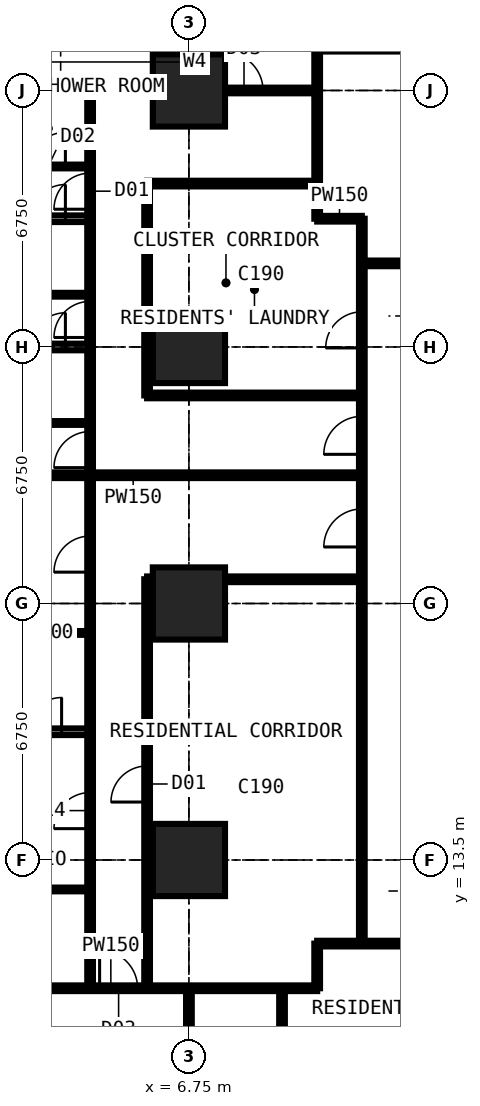
"""IFC4 building model, lengths in metres.
Left out: names, types, materials, properties, quantities, classifications, styles, units other than length and angle.
Written with IfcOpenShell. Run it as: python <this file> out.ifc"""

import sys

from ifc_helpers import new_model, si_unit, direction, frame, frame_2d, origin, origin_2d, place, context, subcontext, project, spatial, rectangle, extrude, element, fill, save


model = new_model("IFC4")
c1 = context("Model", 3, precision=1e-05, world=origin(), true_north=direction((0.0, 1.0)))
c2 = subcontext(c1, "Body", "Model", "MODEL_VIEW")
j1 = project(units=[si_unit("LENGTHUNIT", "METRE"), si_unit("PLANEANGLEUNIT", "RADIAN")], contexts=[c1])
p1 = place(None, origin())
s1 = spatial("IfcSite", under=j1, at=p1, CompositionType="ELEMENT")
p2 = place(p1, origin())
s2 = spatial("IfcBuilding", under=s1, at=p2, CompositionType="ELEMENT")
p3 = place(p2, frame((0.0, 0.0, 21.6)))
s3 = spatial("IfcBuildingStorey", under=s2, at=p3, CompositionType="ELEMENT", Elevation=21.6)
for number, where, z_axis, x_axis in (
    (1, (6.75, 13.5, 0.0), (0.0, 0.0, 1.0), (1.0, 0.0, 0.0)),
    (2, (6.75, 20.25, 0.0), (0.0, 0.0, 1.0), (1.0, 0.0, 0.0)),
    (3, (6.75, 27.0, 0.0), (0.0, 0.0, 1.0), (1.0, 0.0, 0.0)),
    (4, (6.75, 33.75, 0.0), (0.0, 0.0, 1.0), (1.0, 0.0, 0.0)),
):
    element("IfcColumn", number, at=place(p3, frame(where, z_axis=z_axis, x_axis=x_axis)), inside=s3, PredefinedType="COLUMN", context=c2, shape_type="SweptSolid", body=[
        extrude(rectangle(XDim=1.9, YDim=1.9, at=origin_2d()), origin(), (0.0, 0.0, 1.0), 3.6),
    ])
p4 = place(p3, frame((-0.734, 10.125, 0.0), z_axis=(0.0, 0.0, 1.0), x_axis=(1.0, 0.0, 0.0)))
e5 = element("IfcWall", 5, at=p4, inside=s3, PredefinedType="PARTITIONING", context=c2, shape_type="SweptSolid", body=[
    extrude(rectangle(XDim=10.859, YDim=0.15, at=frame_2d((5.429, 0.0))), origin(), (0.0, 0.0, 1.0), 3.375),
])
p5 = place(p4, frame((5.134, 0.0, 0.0)))
e6 = element("IfcOpeningElement", 6, at=p5, cuts=e5, PredefinedType="OPENING", context=c2, shape_type="SweptSolid", body=[
    extrude(rectangle(XDim=1.0, YDim=2.2, at=frame_2d((0.5, 1.1))), frame((0.0, 0.085, 0.0), z_axis=(0.0, -1.0, 0.0), x_axis=(1.0, 0.0, 0.0)), (0.0, 0.0, 1.0), 0.17),
])
p6 = place(p3, frame((-0.734, 16.875, 0.0), z_axis=(0.0, 0.0, 1.0), x_axis=(1.0, 0.0, 0.0)))
e7 = element("IfcWall", 7, at=p6, inside=s3, PredefinedType="PARTITIONING", context=c2, shape_type="SweptSolid", body=[
    extrude(rectangle(XDim=4.884, YDim=0.175, at=frame_2d((2.442, 0.0))), origin(), (0.0, 0.0, 1.0), 3.375),
])
p7 = place(p6, frame((3.234, 0.0, 0.0)))
e8 = element("IfcOpeningElement", 8, at=p7, cuts=e7, PredefinedType="OPENING", context=c2, shape_type="SweptSolid", body=[
    extrude(rectangle(XDim=0.9, YDim=2.2, at=frame_2d((0.45, 1.1))), frame((0.0, 0.097, 0.0), z_axis=(0.0, -1.0, 0.0), x_axis=(1.0, 0.0, 0.0)), (0.0, 0.0, 1.0), 0.195),
])
p8 = place(p3, frame((-0.734, 23.625, 0.0), z_axis=(0.0, 0.0, 1.0), x_axis=(1.0, 0.0, 0.0)))
e9 = element("IfcWall", 9, at=p8, inside=s3, PredefinedType="PARTITIONING", context=c2, shape_type="SweptSolid", body=[
    extrude(rectangle(XDim=12.034, YDim=0.15, at=frame_2d((6.017, 0.0))), origin(), (0.0, 0.0, 1.0), 3.375),
])
p9 = place(p3, frame((-0.734, 27.0, 0.0), z_axis=(0.0, 0.0, 1.0), x_axis=(1.0, 0.0, 0.0)))
e10 = element("IfcWall", 10, at=p9, inside=s3, PredefinedType="PARTITIONING", context=c2, shape_type="SweptSolid", body=[
    extrude(rectangle(XDim=4.884, YDim=0.175, at=frame_2d((2.442, 0.0))), origin(), (0.0, 0.0, 1.0), 2.877),
])
p10 = place(p9, frame((3.334, 0.0, 0.0)))
e11 = element("IfcOpeningElement", 11, at=p10, cuts=e10, PredefinedType="OPENING", context=c2, shape_type="SweptSolid", body=[
    extrude(rectangle(XDim=0.9, YDim=2.2, at=frame_2d((0.45, 1.1))), frame((0.0, 0.097, 0.0), z_axis=(0.0, -1.0, 0.0), x_axis=(1.0, 0.0, 0.0)), (0.0, 0.0, 1.0), 0.195),
])
p11 = place(p3, frame((-0.734, 30.375, 0.0), z_axis=(0.0, 0.0, 1.0), x_axis=(1.0, 0.0, 0.0)))
e12 = element("IfcWall", 12, at=p11, inside=s3, PredefinedType="PARTITIONING", context=c2, shape_type="SweptSolid", body=[
    extrude(rectangle(XDim=4.884, YDim=0.175, at=frame_2d((2.442, 0.0))), origin(), (0.0, 0.0, 1.0), 3.375),
])
p12 = place(p11, frame((3.334, 0.0, 0.0)))
e13 = element("IfcOpeningElement", 13, at=p12, cuts=e12, PredefinedType="OPENING", context=c2, shape_type="SweptSolid", body=[
    extrude(rectangle(XDim=0.9, YDim=2.2, at=frame_2d((0.45, 1.1))), frame((0.0, 0.097, 0.0), z_axis=(0.0, -1.0, 0.0), x_axis=(1.0, 0.0, 0.0)), (0.0, 0.0, 1.0), 0.195),
])
p13 = place(p3, frame((-0.734, 33.75, 0.0), z_axis=(0.0, 0.0, 1.0), x_axis=(1.0, 0.0, 0.0)))
e14 = element("IfcWall", 14, at=p13, inside=s3, PredefinedType="PARTITIONING", context=c2, shape_type="SweptSolid", body=[
    extrude(rectangle(XDim=10.859, YDim=0.15, at=frame_2d((5.429, 0.0))), origin(), (0.0, 0.0, 1.0), 2.877),
])
p14 = place(p13, frame((8.434, 0.0, 0.0)))
e15 = element("IfcOpeningElement", 15, at=p14, cuts=e14, PredefinedType="OPENING", context=c2, shape_type="SweptSolid", body=[
    extrude(rectangle(XDim=1.0, YDim=2.2, at=frame_2d((0.5, 1.1))), frame((0.0, 0.085, 0.0), z_axis=(0.0, -1.0, 0.0), x_axis=(1.0, 0.0, 0.0)), (0.0, 0.0, 1.0), 0.17),
])
for number, where, z_axis, x_axis in (
    (16, (1.75, 12.725, 0.0), (0.0, 0.0, 1.0), (1.0, 0.0, 0.0)),
    (17, (1.75, 19.475, 0.0), (0.0, 0.0, 1.0), (1.0, 0.0, 0.0)),
):
    element("IfcWall", number, at=place(p3, frame(where, z_axis=z_axis, x_axis=x_axis)), inside=s3, PredefinedType="PARTITIONING", context=c2, shape_type="SweptSolid", body=[
        extrude(rectangle(XDim=2.4, YDim=0.1, at=frame_2d((1.2, 0.0))), origin(), (0.0, 0.0, 1.0), 3.375),
    ])
for number, where, z_axis, x_axis in (
    (18, (1.95, 25.0, 0.0), (0.0, 0.0, 1.0), (1.0, 0.0, 0.0)),
    (19, (1.95, 28.375, 0.0), (0.0, 0.0, 1.0), (1.0, 0.0, 0.0)),
):
    element("IfcWall", number, at=place(p3, frame(where, z_axis=z_axis, x_axis=x_axis)), inside=s3, PredefinedType="PARTITIONING", context=c2, shape_type="SweptSolid", body=[
        extrude(rectangle(XDim=2.2, YDim=0.1, at=frame_2d((1.1, 0.0))), origin(), (0.0, 0.0, 1.0), 3.375),
    ])
p15 = place(p3, frame((1.95, 31.75, 0.0), z_axis=(0.0, 0.0, 1.0), x_axis=(1.0, 0.0, 0.0)))
e20 = element("IfcWall", 20, at=p15, inside=s3, PredefinedType="PARTITIONING", context=c2, shape_type="SweptSolid", body=[
    extrude(rectangle(XDim=2.2, YDim=0.1, at=frame_2d((1.1, 0.0))), origin(), (0.0, 0.0, 1.0), 3.375),
])
p16 = place(p15, frame((0.65, 0.0, 0.0)))
e21 = element("IfcOpeningElement", 21, at=p16, cuts=e20, PredefinedType="OPENING", context=c2, shape_type="SweptSolid", body=[
    extrude(rectangle(XDim=0.9, YDim=2.2, at=frame_2d((0.45, 1.1))), frame((0.0, 0.06, 0.0), z_axis=(0.0, -1.0, 0.0), x_axis=(1.0, 0.0, 0.0)), (0.0, 0.0, 1.0), 0.12),
])
p17 = place(p3, frame((4.15, 10.125, 0.0), z_axis=(0.0, 0.0, 1.0), x_axis=(0.0, 1.0, 0.0)))
e22 = element("IfcWall", 22, at=p17, inside=s3, PredefinedType="PARTITIONING", context=c2, shape_type="SweptSolid", body=[
    extrude(rectangle(XDim=23.625, YDim=0.15, at=frame_2d((11.812, 0.0))), origin(), (0.0, 0.0, 1.0), 3.375),
])
p18 = place(p17, frame((20.5, 0.0, 0.0)))
e23 = element("IfcOpeningElement", 23, at=p18, cuts=e22, PredefinedType="OPENING", context=c2, shape_type="SweptSolid", body=[
    extrude(rectangle(XDim=0.95, YDim=2.2, at=frame_2d((0.475, 1.1))), frame((0.0, 0.085, 0.0), z_axis=(0.0, -1.0, 0.0), x_axis=(1.0, 0.0, 0.0)), (0.0, 0.0, 1.0), 0.17),
])
p19 = place(p17, frame((17.125, 0.0, 0.0)))
e24 = element("IfcOpeningElement", 24, at=p19, cuts=e22, PredefinedType="OPENING", context=c2, shape_type="SweptSolid", body=[
    extrude(rectangle(XDim=0.95, YDim=2.2, at=frame_2d((0.475, 1.1))), frame((0.0, 0.085, 0.0), z_axis=(0.0, -1.0, 0.0), x_axis=(1.0, 0.0, 0.0)), (0.0, 0.0, 1.0), 0.17),
])
p20 = place(p17, frame((13.7, 0.0, 0.0)))
e25 = element("IfcOpeningElement", 25, at=p20, cuts=e22, PredefinedType="OPENING", context=c2, shape_type="SweptSolid", body=[
    extrude(rectangle(XDim=0.95, YDim=2.2, at=frame_2d((0.475, 1.1))), frame((0.0, 0.085, 0.0), z_axis=(0.0, -1.0, 0.0), x_axis=(1.0, 0.0, 0.0)), (0.0, 0.0, 1.0), 0.17),
])
p21 = place(p17, frame((4.2, 0.0, 0.0)))
e26 = element("IfcOpeningElement", 26, at=p21, cuts=e22, PredefinedType="OPENING", context=c2, shape_type="SweptSolid", body=[
    extrude(rectangle(XDim=0.95, YDim=2.2, at=frame_2d((0.475, 1.1))), frame((0.0, 0.085, 0.0), z_axis=(0.0, -1.0, 0.0), x_axis=(1.0, 0.0, 0.0)), (0.0, 0.0, 1.0), 0.17),
])
p22 = place(p17, frame((10.95, 0.0, 0.0)))
e27 = element("IfcOpeningElement", 27, at=p22, cuts=e22, PredefinedType="OPENING", context=c2, shape_type="SweptSolid", body=[
    extrude(rectangle(XDim=0.95, YDim=2.2, at=frame_2d((0.475, 1.1))), frame((0.0, 0.085, 0.0), z_axis=(0.0, -1.0, 0.0), x_axis=(1.0, 0.0, 0.0)), (0.0, 0.0, 1.0), 0.17),
])
p23 = place(p3, frame((5.65, 10.125, 0.0), z_axis=(0.0, 0.0, 1.0), x_axis=(0.0, 1.0, 0.0)))
e28 = element("IfcWall", 28, at=p23, inside=s3, PredefinedType="PARTITIONING", context=c2, shape_type="SweptSolid", body=[
    extrude(rectangle(XDim=10.762, YDim=0.15, at=frame_2d((5.381, 0.0))), origin(), (0.0, 0.0, 1.0), 3.375),
])
p24 = place(p23, frame((4.9, 0.0, 0.0)))
e29 = element("IfcOpeningElement", 29, at=p24, cuts=e28, PredefinedType="OPENING", context=c2, shape_type="SweptSolid", body=[
    extrude(rectangle(XDim=0.95, YDim=2.2, at=frame_2d((0.475, 1.1))), frame((0.0, 0.085, 0.0), z_axis=(0.0, -1.0, 0.0), x_axis=(1.0, 0.0, 0.0)), (0.0, 0.0, 1.0), 0.17),
])
p25 = place(p3, frame((5.65, 20.887, 0.0), z_axis=(0.0, 0.0, 1.0), x_axis=(1.0, 0.0, 0.0)))
e30 = element("IfcWall", 30, at=p25, inside=s3, PredefinedType="PARTITIONING", context=c2, shape_type="SweptSolid", body=[
    extrude(rectangle(XDim=5.65, YDim=0.15, at=frame_2d((2.825, 0.0))), origin(), (0.0, 0.0, 1.0), 3.375),
])
p26 = place(p3, frame((5.65, 25.725, 0.0), z_axis=(0.0, 0.0, 1.0), x_axis=(0.0, 1.0, 0.0)))
e31 = element("IfcWall", 31, at=p26, inside=s3, PredefinedType="PARTITIONING", context=c2, shape_type="SweptSolid", body=[
    extrude(rectangle(XDim=5.575, YDim=0.15, at=frame_2d((2.788, 0.0))), origin(), (0.0, 0.0, 1.0), 3.375),
])
p27 = place(p3, frame((5.65, 25.725, 0.0), z_axis=(0.0, 0.0, 1.0), x_axis=(1.0, 0.0, 0.0)))
e32 = element("IfcWall", 32, at=p27, inside=s3, PredefinedType="PARTITIONING", context=c2, shape_type="SweptSolid", body=[
    extrude(rectangle(XDim=5.65, YDim=0.15, at=frame_2d((2.825, 0.0))), origin(), (0.0, 0.0, 1.0), 3.375),
])
p28 = place(p3, frame((5.65, 31.3, 0.0), z_axis=(0.0, 0.0, 1.0), x_axis=(1.0, 0.0, 0.0)))
e33 = element("IfcWall", 33, at=p28, inside=s3, PredefinedType="PARTITIONING", context=c2, shape_type="SweptSolid", body=[
    extrude(rectangle(XDim=4.475, YDim=0.15, at=frame_2d((2.238, 0.0))), origin(), (0.0, 0.0, 1.0), 3.375),
])
p29 = place(p3, frame((6.75, -0.734, 0.0), z_axis=(0.0, 0.0, 1.0), x_axis=(0.0, 1.0, 0.0)))
e34 = element("IfcWall", 34, at=p29, inside=s3, PredefinedType="PARTITIONING", context=c2, shape_type="SweptSolid", body=[
    extrude(rectangle(XDim=10.859, YDim=0.15, at=frame_2d((5.429, 0.0))), origin(), (0.0, 0.0, 1.0), 2.877),
])
p30 = place(p3, frame((9.2, 5.65, 0.0), z_axis=(0.0, 0.0, 1.0), x_axis=(0.0, 1.0, 0.0)))
e35 = element("IfcWall", 35, at=p30, inside=s3, PredefinedType="PARTITIONING", context=c2, shape_type="SweptSolid", body=[
    extrude(rectangle(XDim=4.475, YDim=0.15, at=frame_2d((2.238, 0.0))), origin(), (0.0, 0.0, 1.0), 3.375),
])
p31 = place(p3, frame((10.125, 10.125, 0.0), z_axis=(0.0, 0.0, 1.0), x_axis=(0.0, 1.0, 0.0)))
e36 = element("IfcWall", 36, at=p31, inside=s3, PredefinedType="PARTITIONING", context=c2, shape_type="SweptSolid", body=[
    extrude(rectangle(XDim=1.175, YDim=0.15, at=frame_2d((0.587, 0.0))), origin(), (0.0, 0.0, 1.0), 3.375),
])
p32 = place(p3, frame((10.125, 11.3, 0.0), z_axis=(0.0, 0.0, 1.0), x_axis=(1.0, 0.0, 0.0)))
e37 = element("IfcWall", 37, at=p32, inside=s3, PredefinedType="PARTITIONING", context=c2, shape_type="SweptSolid", body=[
    extrude(rectangle(XDim=20.675, YDim=0.15, at=frame_2d((10.337, 0.0))), origin(), (0.0, 0.0, 1.0), 3.375),
])
p33 = place(p32, frame((8.375, 0.0, 0.0)))
e38 = element("IfcOpeningElement", 38, at=p33, cuts=e37, PredefinedType="OPENING", context=c2, shape_type="SweptSolid", body=[
    extrude(rectangle(XDim=1.0, YDim=2.2, at=frame_2d((0.5, 1.1))), frame((0.0, 0.085, 0.0), z_axis=(0.0, -1.0, 0.0), x_axis=(1.0, 0.0, 0.0)), (0.0, 0.0, 1.0), 0.17),
])
p34 = place(p32, frame((10.975, 0.0, 0.0)))
e39 = element("IfcOpeningElement", 39, at=p34, cuts=e37, PredefinedType="OPENING", context=c2, shape_type="SweptSolid", body=[
    extrude(rectangle(XDim=1.0, YDim=2.2, at=frame_2d((0.5, 1.1))), frame((0.0, 0.085, 0.0), z_axis=(0.0, -1.0, 0.0), x_axis=(1.0, 0.0, 0.0)), (0.0, 0.0, 1.0), 0.17),
])
p35 = place(p32, frame((3.925, 0.0, 0.0)))
e40 = element("IfcOpeningElement", 40, at=p35, cuts=e37, PredefinedType="OPENING", context=c2, shape_type="SweptSolid", body=[
    extrude(rectangle(XDim=0.95, YDim=2.2, at=frame_2d((0.475, 1.1))), frame((0.0, 0.085, 0.0), z_axis=(0.0, -1.0, 0.0), x_axis=(1.0, 0.0, 0.0)), (0.0, 0.0, 1.0), 0.17),
])
p36 = place(p3, frame((10.125, 30.375, 0.0), z_axis=(0.0, 0.0, 1.0), x_axis=(0.0, 1.0, 0.0)))
e41 = element("IfcWall", 41, at=p36, inside=s3, PredefinedType="PARTITIONING", context=c2, shape_type="SweptSolid", body=[
    extrude(rectangle(XDim=10.859, YDim=0.15, at=frame_2d((5.429, 0.0))), origin(), (0.0, 0.0, 1.0), 3.375),
])
p37 = place(p3, frame((10.125, 30.375, 0.0), z_axis=(0.0, 0.0, 1.0), x_axis=(1.0, 0.0, 0.0)))
e42 = element("IfcWall", 42, at=p37, inside=s3, PredefinedType="PARTITIONING", context=c2, shape_type="SweptSolid", body=[
    extrude(rectangle(XDim=1.175, YDim=0.15, at=frame_2d((0.587, 0.0))), origin(), (0.0, 0.0, 1.0), 3.375),
])
p38 = place(p3, frame((11.3, 11.3, 0.0), z_axis=(0.0, 0.0, 1.0), x_axis=(0.0, 1.0, 0.0)))
e43 = element("IfcWall", 43, at=p38, inside=s3, PredefinedType="PARTITIONING", context=c2, shape_type="SweptSolid", body=[
    extrude(rectangle(XDim=19.075, YDim=0.15, at=frame_2d((9.538, 0.0))), origin(), (0.0, 0.0, 1.0), 3.375),
])
p39 = place(p38, frame((12.875, 0.0, 0.0)))
e44 = element("IfcOpeningElement", 44, at=p39, cuts=e43, PredefinedType="OPENING", context=c2, shape_type="SweptSolid", body=[
    extrude(rectangle(XDim=1.0, YDim=2.2, at=frame_2d((0.5, 1.1))), frame((0.0, 0.085, 0.0), z_axis=(0.0, -1.0, 0.0), x_axis=(1.0, 0.0, 0.0)), (0.0, 0.0, 1.0), 0.17),
])
p40 = place(p38, frame((10.438, 0.0, 0.0)))
e45 = element("IfcOpeningElement", 45, at=p40, cuts=e43, PredefinedType="OPENING", context=c2, shape_type="SweptSolid", body=[
    extrude(rectangle(XDim=1.0, YDim=2.2, at=frame_2d((0.5, 1.1))), frame((0.0, 0.085, 0.0), z_axis=(0.0, -1.0, 0.0), x_axis=(1.0, 0.0, 0.0)), (0.0, 0.0, 1.0), 0.17),
])
p41 = place(p38, frame((15.675, 0.0, 0.0)))
e46 = element("IfcOpeningElement", 46, at=p41, cuts=e43, PredefinedType="OPENING", context=c2, shape_type="SweptSolid", body=[
    extrude(rectangle(XDim=0.95, YDim=2.2, at=frame_2d((0.475, 1.1))), frame((0.0, 0.085, 0.0), z_axis=(0.0, -1.0, 0.0), x_axis=(1.0, 0.0, 0.0)), (0.0, 0.0, 1.0), 0.17),
])
p42 = place(p3, frame((11.3, 29.2, 0.0), z_axis=(0.0, 0.0, 1.0), x_axis=(1.0, 0.0, 0.0)))
e47 = element("IfcWall", 47, at=p42, inside=s3, PredefinedType="PARTITIONING", context=c2, shape_type="SweptSolid", body=[
    extrude(rectangle(XDim=19.075, YDim=0.15, at=frame_2d((9.538, 0.0))), origin(), (0.0, 0.0, 1.0), 3.375),
])
p43 = place(p42, frame((12.875, 0.0, 0.0)))
e48 = element("IfcOpeningElement", 48, at=p43, cuts=e47, PredefinedType="OPENING", context=c2, shape_type="SweptSolid", body=[
    extrude(rectangle(XDim=1.0, YDim=2.2, at=frame_2d((0.5, 1.1))), frame((0.0, 0.085, 0.0), z_axis=(0.0, -1.0, 0.0), x_axis=(1.0, 0.0, 0.0)), (0.0, 0.0, 1.0), 0.17),
])
p44 = place(p42, frame((10.438, 0.0, 0.0)))
e49 = element("IfcOpeningElement", 49, at=p44, cuts=e47, PredefinedType="OPENING", context=c2, shape_type="SweptSolid", body=[
    extrude(rectangle(XDim=1.0, YDim=2.2, at=frame_2d((0.5, 1.1))), frame((0.0, 0.085, 0.0), z_axis=(0.0, -1.0, 0.0), x_axis=(1.0, 0.0, 0.0)), (0.0, 0.0, 1.0), 0.17),
])
p45 = place(p42, frame((14.875, 0.0, 0.0)))
e50 = element("IfcOpeningElement", 50, at=p45, cuts=e47, PredefinedType="OPENING", context=c2, shape_type="SweptSolid", body=[
    extrude(rectangle(XDim=0.95, YDim=2.2, at=frame_2d((0.475, 1.1))), frame((0.0, 0.085, 0.0), z_axis=(0.0, -1.0, 0.0), x_axis=(1.0, 0.0, 0.0)), (0.0, 0.0, 1.0), 0.17),
])
p46 = place(p5, origin())
e51 = element("IfcDoor", 51, at=p46, inside=s3, OperationType="SINGLE_SWING_LEFT", PredefinedType="DOOR", context=c2, shape_type="SweptSolid", body=[
    extrude(rectangle(XDim=1.0, YDim=2.2, at=frame_2d((0.5, 1.1))), frame((0.0, 0.025, 0.0), z_axis=(0.0, -1.0, 0.0), x_axis=(1.0, 0.0, 0.0)), (0.0, 0.0, 1.0), 0.05),
])
fill(e6, e51)
p47 = place(p14, origin())
e52 = element("IfcDoor", 52, at=p47, inside=s3, OperationType="SINGLE_SWING_LEFT", PredefinedType="DOOR", context=c2, shape_type="SweptSolid", body=[
    extrude(rectangle(XDim=1.0, YDim=2.2, at=frame_2d((0.5, 1.1))), frame((0.0, 0.025, 0.0), z_axis=(0.0, -1.0, 0.0), x_axis=(1.0, 0.0, 0.0)), (0.0, 0.0, 1.0), 0.05),
])
fill(e15, e52)
p48 = place(p18, origin())
e53 = element("IfcDoor", 53, at=p48, inside=s3, OperationType="SINGLE_SWING_LEFT", PredefinedType="DOOR", context=c2, shape_type="SweptSolid", body=[
    extrude(rectangle(XDim=0.95, YDim=2.2, at=frame_2d((0.475, 1.1))), frame((0.0, 0.025, 0.0), z_axis=(0.0, -1.0, 0.0), x_axis=(1.0, 0.0, 0.0)), (0.0, 0.0, 1.0), 0.05),
])
fill(e23, e53)
p49 = place(p16, origin())
e54 = element("IfcDoor", 54, at=p49, inside=s3, OperationType="SINGLE_SWING_RIGHT", PredefinedType="DOOR", context=c2, shape_type="SweptSolid", body=[
    extrude(rectangle(XDim=0.9, YDim=2.2, at=frame_2d((0.45, 1.1))), frame((0.0, 0.025, 0.0), z_axis=(0.0, -1.0, 0.0), x_axis=(1.0, 0.0, 0.0)), (0.0, 0.0, 1.0), 0.05),
])
fill(e21, e54)
p50 = place(p19, origin())
e55 = element("IfcDoor", 55, at=p50, inside=s3, OperationType="SINGLE_SWING_LEFT", PredefinedType="DOOR", context=c2, shape_type="SweptSolid", body=[
    extrude(rectangle(XDim=0.95, YDim=2.2, at=frame_2d((0.475, 1.1))), frame((0.0, 0.025, 0.0), z_axis=(0.0, -1.0, 0.0), x_axis=(1.0, 0.0, 0.0)), (0.0, 0.0, 1.0), 0.05),
])
fill(e24, e55)
p51 = place(p12, origin())
e56 = element("IfcDoor", 56, at=p51, inside=s3, OperationType="SINGLE_SWING_RIGHT", PredefinedType="DOOR", context=c2, shape_type="SweptSolid", body=[
    extrude(rectangle(XDim=0.9, YDim=2.2, at=frame_2d((0.45, 1.1))), frame((0.0, 0.025, 0.0), z_axis=(0.0, -1.0, 0.0), x_axis=(1.0, 0.0, 0.0)), (0.0, 0.0, 1.0), 0.05),
])
fill(e13, e56)
p52 = place(p20, origin())
e57 = element("IfcDoor", 57, at=p52, inside=s3, OperationType="SINGLE_SWING_LEFT", PredefinedType="DOOR", context=c2, shape_type="SweptSolid", body=[
    extrude(rectangle(XDim=0.95, YDim=2.2, at=frame_2d((0.475, 1.1))), frame((0.0, 0.025, 0.0), z_axis=(0.0, -1.0, 0.0), x_axis=(1.0, 0.0, 0.0)), (0.0, 0.0, 1.0), 0.05),
])
fill(e25, e57)
p53 = place(p10, origin())
e58 = element("IfcDoor", 58, at=p53, inside=s3, OperationType="SINGLE_SWING_RIGHT", PredefinedType="DOOR", context=c2, shape_type="SweptSolid", body=[
    extrude(rectangle(XDim=0.9, YDim=2.2, at=frame_2d((0.45, 1.1))), frame((0.0, 0.025, 0.0), z_axis=(0.0, -1.0, 0.0), x_axis=(1.0, 0.0, 0.0)), (0.0, 0.0, 1.0), 0.05),
])
fill(e11, e58)
p54 = place(p39, origin())
e59 = element("IfcDoor", 59, at=p54, inside=s3, OperationType="SINGLE_SWING_LEFT", PredefinedType="DOOR", context=c2, shape_type="SweptSolid", body=[
    extrude(rectangle(XDim=1.0, YDim=2.2, at=frame_2d((0.5, 1.1))), frame((0.0, 0.025, 0.0), z_axis=(0.0, -1.0, 0.0), x_axis=(1.0, 0.0, 0.0)), (0.0, 0.0, 1.0), 0.05),
])
fill(e44, e59)
p55 = place(p21, origin())
e60 = element("IfcDoor", 60, at=p55, inside=s3, OperationType="SINGLE_SWING_LEFT", PredefinedType="DOOR", context=c2, shape_type="SweptSolid", body=[
    extrude(rectangle(XDim=0.95, YDim=2.2, at=frame_2d((0.475, 1.1))), frame((0.0, 0.025, 0.0), z_axis=(0.0, -1.0, 0.0), x_axis=(1.0, 0.0, 0.0)), (0.0, 0.0, 1.0), 0.05),
])
fill(e26, e60)
p56 = place(p22, origin())
e61 = element("IfcDoor", 61, at=p56, inside=s3, OperationType="SINGLE_SWING_LEFT", PredefinedType="DOOR", context=c2, shape_type="SweptSolid", body=[
    extrude(rectangle(XDim=0.95, YDim=2.2, at=frame_2d((0.475, 1.1))), frame((0.0, 0.025, 0.0), z_axis=(0.0, -1.0, 0.0), x_axis=(1.0, 0.0, 0.0)), (0.0, 0.0, 1.0), 0.05),
])
fill(e27, e61)
p57 = place(p7, origin())
e62 = element("IfcDoor", 62, at=p57, inside=s3, OperationType="SINGLE_SWING_RIGHT", PredefinedType="DOOR", context=c2, shape_type="SweptSolid", body=[
    extrude(rectangle(XDim=0.9, YDim=2.2, at=frame_2d((0.45, 1.1))), frame((0.0, 0.025, 0.0), z_axis=(0.0, -1.0, 0.0), x_axis=(1.0, 0.0, 0.0)), (0.0, 0.0, 1.0), 0.05),
])
fill(e8, e62)
p58 = place(p40, origin())
e63 = element("IfcDoor", 63, at=p58, inside=s3, OperationType="SINGLE_SWING_LEFT", PredefinedType="DOOR", context=c2, shape_type="SweptSolid", body=[
    extrude(rectangle(XDim=1.0, YDim=2.2, at=frame_2d((0.5, 1.1))), frame((0.0, 0.025, 0.0), z_axis=(0.0, -1.0, 0.0), x_axis=(1.0, 0.0, 0.0)), (0.0, 0.0, 1.0), 0.05),
])
fill(e45, e63)
p59 = place(p41, origin())
e64 = element("IfcDoor", 64, at=p59, inside=s3, OperationType="SINGLE_SWING_LEFT", PredefinedType="DOOR", context=c2, shape_type="SweptSolid", body=[
    extrude(rectangle(XDim=0.95, YDim=2.2, at=frame_2d((0.475, 1.1))), frame((0.0, 0.025, 0.0), z_axis=(0.0, -1.0, 0.0), x_axis=(1.0, 0.0, 0.0)), (0.0, 0.0, 1.0), 0.05),
])
fill(e46, e64)
p60 = place(p24, origin())
e65 = element("IfcDoor", 65, at=p60, inside=s3, OperationType="SINGLE_SWING_LEFT", PredefinedType="DOOR", context=c2, shape_type="SweptSolid", body=[
    extrude(rectangle(XDim=0.95, YDim=2.2, at=frame_2d((0.475, 1.1))), frame((0.0, 0.025, 0.0), z_axis=(0.0, -1.0, 0.0), x_axis=(1.0, 0.0, 0.0)), (0.0, 0.0, 1.0), 0.05),
])
fill(e29, e65)
save(model, sys.argv[1])
